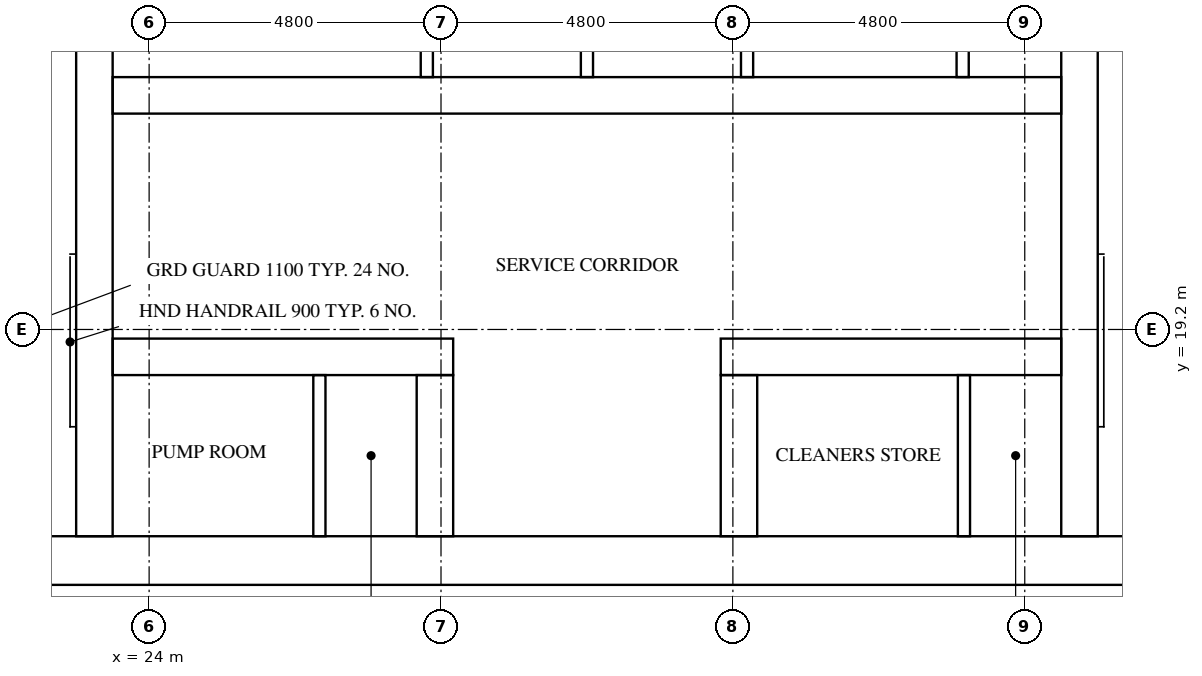
"""IFC4 building model, lengths in metres.
Left out: names, types, materials, properties, quantities, classifications, styles, units other than length and angle.
Written with IfcOpenShell. Run it as: python <this file> out.ifc"""

import sys

from ifc_helpers import new_model, si_unit, direction, frame, frame_2d, origin, place, context, subcontext, project, spatial, rectangle, extrude, element, fill, save


model = new_model("IFC4")
c1 = context("Model", 3, precision=1e-05, world=origin(), true_north=direction((0.0, 1.0)))
c2 = subcontext(c1, "Body", "Model", "MODEL_VIEW")
j1 = project(units=[si_unit("LENGTHUNIT", "METRE"), si_unit("PLANEANGLEUNIT", "RADIAN")], contexts=[c1])
p1 = place(None, origin())
s1 = spatial("IfcSite", under=j1, at=p1, CompositionType="ELEMENT")
p2 = place(p1, origin())
s2 = spatial("IfcBuilding", under=s1, at=p2, CompositionType="ELEMENT")
p3 = place(p2, frame((0.0, 0.0, 159.5)))
s3 = spatial("IfcBuildingStorey", under=s2, at=p3, CompositionType="ELEMENT", Elevation=159.5)
p4 = place(p3, frame((15.0, 15.4, 0.0), z_axis=(0.0, 0.0, 1.0), x_axis=(1.0, 0.0, 0.0)))
e1 = element("IfcWall", 1, at=p4, inside=s3, PredefinedType="SHEAR", context=c2, shape_type="SweptSolid", body=[
    extrude(rectangle(XDim=32.4, YDim=0.8, at=frame_2d((16.2, 0.0))), origin(), (0.0, 0.0, 1.0), 3.2),
])
p5 = place(p4, frame((15.3, 0.0, 0.0)))
e2 = element("IfcOpeningElement", 2, at=p5, cuts=e1, PredefinedType="OPENING", context=c2, shape_type="SweptSolid", body=[
    extrude(rectangle(XDim=1.8, YDim=2.1, at=frame_2d((0.9, 1.05))), frame((0.0, 0.41, 0.0), z_axis=(0.0, -1.0, 0.0), x_axis=(1.0, 0.0, 0.0)), (0.0, 0.0, 1.0), 0.82),
])
p6 = place(p3, frame((23.1, 15.8, 0.0), z_axis=(0.0, 0.0, 1.0), x_axis=(0.0, 1.0, 0.0)))
e3 = element("IfcWall", 3, at=p6, inside=s3, PredefinedType="SHEAR", context=c2, shape_type="SweptSolid", body=[
    extrude(rectangle(XDim=21.2, YDim=0.6, at=frame_2d((10.6, 0.0))), origin(), (0.0, 0.0, 1.0), 3.2),
])
p7 = place(p3, frame((39.3, 15.8, 0.0), z_axis=(0.0, 0.0, 1.0), x_axis=(0.0, 1.0, 0.0)))
e4 = element("IfcWall", 4, at=p7, inside=s3, PredefinedType="SHEAR", context=c2, shape_type="SweptSolid", body=[
    extrude(rectangle(XDim=8.45, YDim=0.6, at=frame_2d((4.225, 0.0))), origin(), (0.0, 0.0, 1.0), 3.2),
])
p8 = place(p3, frame((23.4, 18.75, 0.0), z_axis=(0.0, 0.0, 1.0), x_axis=(1.0, 0.0, 0.0)))
e5 = element("IfcWall", 5, at=p8, inside=s3, PredefinedType="SHEAR", context=c2, shape_type="SweptSolid", body=[
    extrude(rectangle(XDim=5.6, YDim=0.6, at=frame_2d((2.8, 0.0))), origin(), (0.0, 0.0, 1.0), 3.2),
])
p9 = place(p8, frame((1.15, 0.0, 0.0)))
e6 = element("IfcOpeningElement", 6, at=p9, cuts=e5, PredefinedType="OPENING", context=c2, shape_type="SweptSolid", body=[
    extrude(rectangle(XDim=1.0, YDim=2.1, at=frame_2d((0.5, 1.05))), frame((0.0, 0.31, 0.0), z_axis=(0.0, -1.0, 0.0), x_axis=(1.0, 0.0, 0.0)), (0.0, 0.0, 1.0), 0.62),
])
p10 = place(p8, frame((3.75, 0.0, 0.0)))
e7 = element("IfcOpeningElement", 7, at=p10, cuts=e5, PredefinedType="OPENING", context=c2, shape_type="SweptSolid", body=[
    extrude(rectangle(XDim=1.0, YDim=2.1, at=frame_2d((0.5, 1.05))), frame((0.0, 0.31, 0.0), z_axis=(0.0, -1.0, 0.0), x_axis=(1.0, 0.0, 0.0)), (0.0, 0.0, 1.0), 0.62),
])
p11 = place(p3, frame((33.4, 18.75, 0.0), z_axis=(0.0, 0.0, 1.0), x_axis=(1.0, 0.0, 0.0)))
e8 = element("IfcWall", 8, at=p11, inside=s3, PredefinedType="SHEAR", context=c2, shape_type="SweptSolid", body=[
    extrude(rectangle(XDim=5.6, YDim=0.6, at=frame_2d((2.8, 0.0))), origin(), (0.0, 0.0, 1.0), 3.2),
])
p12 = place(p11, frame((1.75, 0.0, 0.0)))
e9 = element("IfcOpeningElement", 9, at=p12, cuts=e8, PredefinedType="OPENING", context=c2, shape_type="SweptSolid", body=[
    extrude(rectangle(XDim=1.0, YDim=2.1, at=frame_2d((0.5, 1.05))), frame((0.0, 0.31, 0.0), z_axis=(0.0, -1.0, 0.0), x_axis=(1.0, 0.0, 0.0)), (0.0, 0.0, 1.0), 0.62),
])
p13 = place(p11, frame((4.35, 0.0, 0.0)))
e10 = element("IfcOpeningElement", 10, at=p13, cuts=e8, PredefinedType="OPENING", context=c2, shape_type="SweptSolid", body=[
    extrude(rectangle(XDim=1.0, YDim=2.1, at=frame_2d((0.5, 1.05))), frame((0.0, 0.31, 0.0), z_axis=(0.0, -1.0, 0.0), x_axis=(1.0, 0.0, 0.0)), (0.0, 0.0, 1.0), 0.62),
])
p14 = place(p3, frame((23.4, 23.05, 0.0), z_axis=(0.0, 0.0, 1.0), x_axis=(1.0, 0.0, 0.0)))
e11 = element("IfcWall", 11, at=p14, inside=s3, PredefinedType="SHEAR", context=c2, shape_type="SweptSolid", body=[
    extrude(rectangle(XDim=15.6, YDim=0.6, at=frame_2d((7.8, 0.0))), origin(), (0.0, 0.0, 1.0), 3.2),
])
p15 = place(p14, frame((2.033, 0.0, 0.0)))
e12 = element("IfcOpeningElement", 12, at=p15, cuts=e11, PredefinedType="OPENING", context=c2, shape_type="SweptSolid", body=[
    extrude(rectangle(XDim=1.0, YDim=2.1, at=frame_2d((0.5, 1.05))), frame((0.0, 0.31, 0.0), z_axis=(0.0, -1.0, 0.0), x_axis=(1.0, 0.0, 0.0)), (0.0, 0.0, 1.0), 0.62),
])
p16 = place(p14, frame((11.706, 0.0, 0.0)))
e13 = element("IfcOpeningElement", 13, at=p16, cuts=e11, PredefinedType="OPENING", context=c2, shape_type="SweptSolid", body=[
    extrude(rectangle(XDim=1.0, YDim=2.1, at=frame_2d((0.5, 1.05))), frame((0.0, 0.31, 0.0), z_axis=(0.0, -1.0, 0.0), x_axis=(1.0, 0.0, 0.0)), (0.0, 0.0, 1.0), 0.62),
])
p17 = place(p14, frame((14.339, 0.0, 0.0)))
e14 = element("IfcOpeningElement", 14, at=p17, cuts=e11, PredefinedType="OPENING", context=c2, shape_type="SweptSolid", body=[
    extrude(rectangle(XDim=1.0, YDim=2.1, at=frame_2d((0.5, 1.05))), frame((0.0, 0.31, 0.0), z_axis=(0.0, -1.0, 0.0), x_axis=(1.0, 0.0, 0.0)), (0.0, 0.0, 1.0), 0.62),
])
for number, where, z_axis, x_axis in (
    (15, (28.7, 15.8, 0.0), (0.0, 0.0, 1.0), (0.0, 1.0, 0.0)),
    (16, (33.7, 15.8, 0.0), (0.0, 0.0, 1.0), (0.0, 1.0, 0.0)),
):
    element("IfcWall", number, at=place(p3, frame(where, z_axis=z_axis, x_axis=x_axis)), inside=s3, PredefinedType="SHEAR", context=c2, shape_type="SweptSolid", body=[
        extrude(rectangle(XDim=2.65, YDim=0.6, at=frame_2d((1.325, 0.0))), origin(), (0.0, 0.0, 1.0), 3.2),
    ])
for number, where, z_axis, x_axis in (
    (17, (28.567, 23.35, 0.0), (0.0, 0.0, 1.0), (0.0, 1.0, 0.0)),
    (18, (31.2, 23.35, 0.0), (0.0, 0.0, 1.0), (0.0, 1.0, 0.0)),
    (19, (33.833, 23.35, 0.0), (0.0, 0.0, 1.0), (0.0, 1.0, 0.0)),
):
    element("IfcWall", number, at=place(p3, frame(where, z_axis=z_axis, x_axis=x_axis)), inside=s3, PredefinedType="SOLIDWALL", context=c2, shape_type="SweptSolid", body=[
        extrude(rectangle(XDim=2.5, YDim=0.2, at=frame_2d((1.25, 0.0))), origin(), (0.0, 0.0, 1.0), 3.2),
    ])
p18 = place(p3, frame((37.379, 23.35, 0.0), z_axis=(0.0, 0.0, 1.0), x_axis=(0.0, 1.0, 0.0)))
e20 = element("IfcWall", 20, at=p18, inside=s3, PredefinedType="PARTITIONING", context=c2, shape_type="SweptSolid", body=[
    extrude(rectangle(XDim=2.5, YDim=0.2, at=frame_2d((1.25, 0.0))), origin(), (0.0, 0.0, 1.0), 3.2),
])
for number, where, z_axis, x_axis in (
    (21, (26.8, 15.8, 0.0), (0.0, 0.0, 1.0), (0.0, 1.0, 0.0)),
    (22, (37.4, 15.8, 0.0), (0.0, 0.0, 1.0), (0.0, 1.0, 0.0)),
):
    element("IfcWall", number, at=place(p3, frame(where, z_axis=z_axis, x_axis=x_axis)), inside=s3, PredefinedType="PARTITIONING", context=c2, shape_type="SweptSolid", body=[
        extrude(rectangle(XDim=2.65, YDim=0.2, at=frame_2d((1.325, 0.0))), origin(), (0.0, 0.0, 1.0), 3.2),
    ])
p19 = place(p5, frame((1.8, 0.0, 0.0), z_axis=(0.0, 0.0, 1.0), x_axis=(-1.0, 0.0, 0.0)))
e23 = element("IfcDoor", 23, at=p19, inside=s3, OperationType="DOUBLE_DOOR_SINGLE_SWING", PredefinedType="DOOR", context=c2, shape_type="SweptSolid", body=[
    extrude(rectangle(XDim=1.8, YDim=2.1, at=frame_2d((0.9, 1.05))), frame((0.0, 0.025, 0.0), z_axis=(0.0, -1.0, 0.0), x_axis=(1.0, 0.0, 0.0)), (0.0, 0.0, 1.0), 0.05),
])
fill(e2, e23)
p20 = place(p15, frame((1.0, 0.0, 0.0), z_axis=(0.0, 0.0, 1.0), x_axis=(-1.0, 0.0, 0.0)))
e24 = element("IfcDoor", 24, at=p20, inside=s3, OperationType="SINGLE_SWING_RIGHT", PredefinedType="DOOR", context=c2, shape_type="SweptSolid", body=[
    extrude(rectangle(XDim=1.0, YDim=2.1, at=frame_2d((0.5, 1.05))), frame((0.0, 0.025, 0.0), z_axis=(0.0, -1.0, 0.0), x_axis=(1.0, 0.0, 0.0)), (0.0, 0.0, 1.0), 0.05),
])
fill(e12, e24)
p21 = place(p16, frame((1.0, 0.0, 0.0), z_axis=(0.0, 0.0, 1.0), x_axis=(-1.0, 0.0, 0.0)))
e25 = element("IfcDoor", 25, at=p21, inside=s3, OperationType="SINGLE_SWING_LEFT", PredefinedType="DOOR", context=c2, shape_type="SweptSolid", body=[
    extrude(rectangle(XDim=1.0, YDim=2.1, at=frame_2d((0.5, 1.05))), frame((0.0, 0.025, 0.0), z_axis=(0.0, -1.0, 0.0), x_axis=(1.0, 0.0, 0.0)), (0.0, 0.0, 1.0), 0.05),
])
fill(e13, e25)
p22 = place(p17, frame((1.0, 0.0, 0.0), z_axis=(0.0, 0.0, 1.0), x_axis=(-1.0, 0.0, 0.0)))
e26 = element("IfcDoor", 26, at=p22, inside=s3, OperationType="SINGLE_SWING_RIGHT", PredefinedType="DOOR", context=c2, shape_type="SweptSolid", body=[
    extrude(rectangle(XDim=1.0, YDim=2.1, at=frame_2d((0.5, 1.05))), frame((0.0, 0.025, 0.0), z_axis=(0.0, -1.0, 0.0), x_axis=(1.0, 0.0, 0.0)), (0.0, 0.0, 1.0), 0.05),
])
fill(e14, e26)
p23 = place(p9, origin())
e27 = element("IfcDoor", 27, at=p23, inside=s3, OperationType="SINGLE_SWING_LEFT", PredefinedType="DOOR", context=c2, shape_type="SweptSolid", body=[
    extrude(rectangle(XDim=1.0, YDim=2.1, at=frame_2d((0.5, 1.05))), frame((0.0, 0.025, 0.0), z_axis=(0.0, -1.0, 0.0), x_axis=(1.0, 0.0, 0.0)), (0.0, 0.0, 1.0), 0.05),
])
fill(e6, e27)
p24 = place(p10, origin())
e28 = element("IfcDoor", 28, at=p24, inside=s3, OperationType="SINGLE_SWING_RIGHT", PredefinedType="DOOR", context=c2, shape_type="SweptSolid", body=[
    extrude(rectangle(XDim=1.0, YDim=2.1, at=frame_2d((0.5, 1.05))), frame((0.0, 0.025, 0.0), z_axis=(0.0, -1.0, 0.0), x_axis=(1.0, 0.0, 0.0)), (0.0, 0.0, 1.0), 0.05),
])
fill(e7, e28)
p25 = place(p12, origin())
e29 = element("IfcDoor", 29, at=p25, inside=s3, OperationType="SINGLE_SWING_LEFT", PredefinedType="DOOR", context=c2, shape_type="SweptSolid", body=[
    extrude(rectangle(XDim=1.0, YDim=2.1, at=frame_2d((0.5, 1.05))), frame((0.0, 0.025, 0.0), z_axis=(0.0, -1.0, 0.0), x_axis=(1.0, 0.0, 0.0)), (0.0, 0.0, 1.0), 0.05),
])
fill(e9, e29)
p26 = place(p13, origin())
e30 = element("IfcDoor", 30, at=p26, inside=s3, OperationType="SINGLE_SWING_RIGHT", PredefinedType="DOOR", context=c2, shape_type="SweptSolid", body=[
    extrude(rectangle(XDim=1.0, YDim=2.1, at=frame_2d((0.5, 1.05))), frame((0.0, 0.025, 0.0), z_axis=(0.0, -1.0, 0.0), x_axis=(1.0, 0.0, 0.0)), (0.0, 0.0, 1.0), 0.05),
])
fill(e10, e30)
save(model, sys.argv[1])
